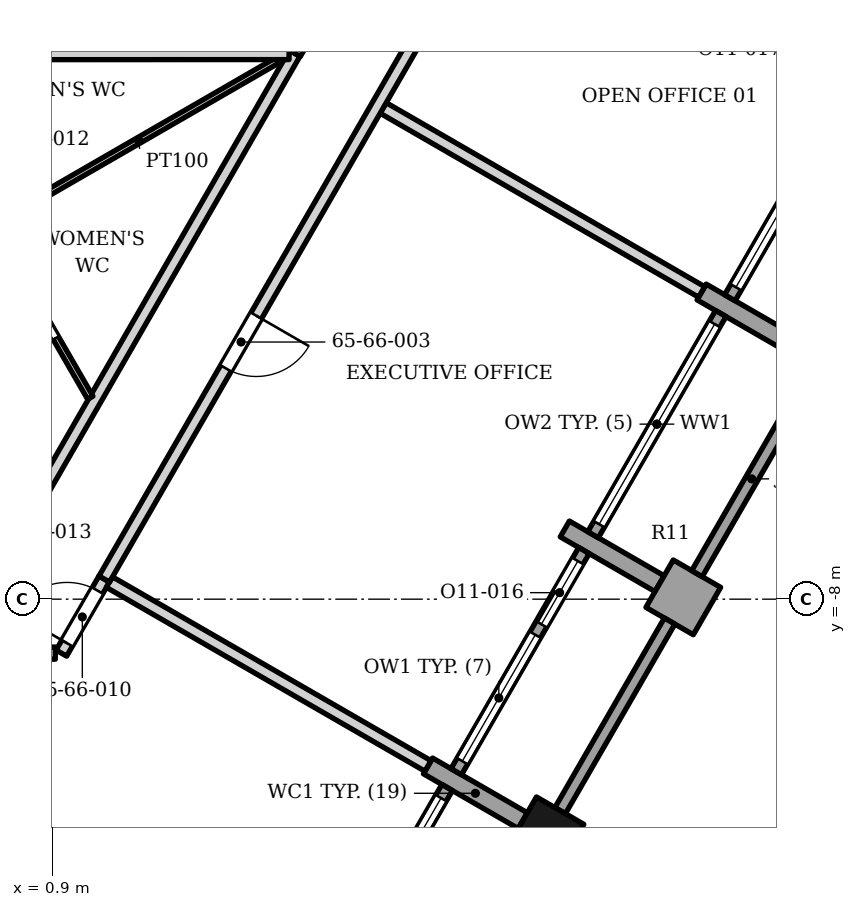
"""IFC4 building model, lengths in metres.
Left out: names, types, materials, properties, quantities, classifications, styles, units other than length and angle.
Written with IfcOpenShell. Run it as: python <this file> out.ifc"""

import sys

from ifc_helpers import new_model, si_unit, direction, frame, frame_2d, origin, origin_2d, place, context, subcontext, project, spatial, rectangle, extrude, element, fill, save


model = new_model("IFC4")
c1 = context("Model", 3, precision=1e-05, world=origin(), true_north=direction((0.0, 1.0)))
c2 = subcontext(c1, "Body", "Model", "MODEL_VIEW")
j1 = project(units=[si_unit("LENGTHUNIT", "METRE"), si_unit("PLANEANGLEUNIT", "RADIAN")], contexts=[c1])
p1 = place(None, origin())
s1 = spatial("IfcSite", under=j1, at=p1, CompositionType="ELEMENT")
p2 = place(p1, origin())
s2 = spatial("IfcBuilding", under=s1, at=p2, CompositionType="ELEMENT")
p3 = place(p2, frame((0.0, 0.0, 271.6)))
s3 = spatial("IfcBuildingStorey", under=s2, at=p3, CompositionType="ELEMENT", Elevation=271.6)
p4 = place(p3, frame((9.03, -11.867, 0.0), z_axis=(0.0, 0.0, 1.0), x_axis=(0.499999984885, 0.866025412511, 0.0)))
e1 = element("IfcColumn", 1, at=p4, inside=s3, PredefinedType="COLUMN", context=c2, shape_type="SweptSolid", body=[
    extrude(rectangle(XDim=0.9, YDim=0.9, at=origin_2d()), origin(), (0.0, 0.0, 1.0), 3.9),
])
p5 = place(p3, frame((8.64, -11.642, 0.0), z_axis=(0.0, 0.0, 1.0), x_axis=(-0.866047807691, 0.499961193289, 0.0)))
e2 = element("IfcWall", 2, at=p5, inside=s3, PredefinedType="SOLIDWALL", context=c2, shape_type="SweptSolid", body=[
    extrude(rectangle(XDim=1.8, YDim=0.3, at=frame_2d((0.9, 0.0))), origin(), (0.0, 0.0, 1.0), 3.0),
])
p6 = place(p3, frame((10.89, -7.745, 0.0), z_axis=(0.0, 0.0, 1.0), x_axis=(0.866081705922, -0.499902469156, 0.0)))
e3 = element("IfcWall", 3, at=p6, inside=s3, PredefinedType="SOLIDWALL", context=c2, shape_type="SweptSolid", body=[
    extrude(rectangle(XDim=0.9, YDim=0.9, at=frame_2d((0.45, 0.0))), origin(), (0.0, 0.0, 1.0), 3.0),
])
for number, where, z_axis, x_axis in (
    (4, (10.89, -7.745, 0.0), (0.0, 0.0, 1.0), (-0.866, 0.5, 0.0)),
    (5, (13.14, -3.848, 0.0), (0.0, 0.0, 1.0), (-0.866, 0.5, 0.0)),
):
    element("IfcWall", number, at=place(p3, frame(where, z_axis=z_axis, x_axis=x_axis)), inside=s3, PredefinedType="SOLIDWALL", context=c2, shape_type="SweptSolid", body=[
        extrude(rectangle(XDim=1.8, YDim=0.3, at=frame_2d((0.9, 0.0))), origin(), (0.0, 0.0, 1.0), 3.0),
    ])
p7 = place(p3, frame((5.296, -14.734, 0.0), z_axis=(0.0, 0.0, 1.0), x_axis=(0.49998411664, 0.866034573852, 0.0)))
e6 = element("IfcWall", 6, at=p7, inside=s3, PredefinedType="ELEMENTEDWALL", context=c2, shape_type="SweptSolid", body=[
    extrude(rectangle(XDim=4.2, YDim=0.2, at=frame_2d((2.1, 0.0))), origin(), (0.0, 0.0, 1.0), 2.95),
])
p8 = place(p7, frame((0.2, 0.0, 0.45)))
e7 = element("IfcOpeningElement", 7, at=p8, cuts=e6, PredefinedType="OPENING", context=c2, shape_type="SweptSolid", body=[
    extrude(rectangle(XDim=3.8, YDim=2.25, at=frame_2d((1.9, 1.125))), frame((0.0, 0.11, 0.0), z_axis=(0.0, -1.0, 0.0), x_axis=(1.0, 0.0, 0.0)), (0.0, 0.0, 1.0), 0.22),
])
p9 = place(p3, frame((9.255, -11.478, 0.0), z_axis=(0.0, 0.0, 1.0), x_axis=(0.500012057535, 0.866018442252, 0.0)))
e8 = element("IfcWall", 8, at=p9, inside=s3, PredefinedType="SOLIDWALL", context=c2, shape_type="SweptSolid", body=[
    extrude(rectangle(XDim=3.6, YDim=0.2, at=frame_2d((1.8, 0.0))), origin(), (0.0, 0.0, 1.0), 3.0),
])
p10 = place(p3, frame((7.546, -10.837, 0.0), z_axis=(0.0, 0.0, 1.0), x_axis=(0.49998411664, 0.866034573852, 0.0)))
e9 = element("IfcWall", 9, at=p10, inside=s3, PredefinedType="ELEMENTEDWALL", context=c2, shape_type="SweptSolid", body=[
    extrude(rectangle(XDim=4.2, YDim=0.2, at=frame_2d((2.1, 0.0))), origin(), (0.0, 0.0, 1.0), 3.0),
])
p11 = place(p10, frame((0.2, 0.0, 0.45)))
e10 = element("IfcOpeningElement", 10, at=p11, cuts=e9, PredefinedType="OPENING", context=c2, shape_type="SweptSolid", body=[
    extrude(rectangle(XDim=2.4, YDim=2.25, at=frame_2d((1.2, 1.125))), frame((0.0, 0.11, 0.0), z_axis=(0.0, -1.0, 0.0), x_axis=(1.0, 0.0, 0.0)), (0.0, 0.0, 1.0), 0.22),
])
p12 = place(p10, frame((2.8, 0.0, 0.0)))
e11 = element("IfcOpeningElement", 11, at=p12, cuts=e9, PredefinedType="OPENING", context=c2, shape_type="SweptSolid", body=[
    extrude(rectangle(XDim=1.2, YDim=2.7, at=frame_2d((0.6, 1.35))), frame((0.0, 0.11, 0.0), z_axis=(0.0, -1.0, 0.0), x_axis=(1.0, 0.0, 0.0)), (0.0, 0.0, 1.0), 0.22),
])
p13 = place(p3, frame((11.505, -7.58, 0.0), z_axis=(0.0, 0.0, 1.0), x_axis=(0.500012057535, 0.866018442252, 0.0)))
e12 = element("IfcWall", 12, at=p13, inside=s3, PredefinedType="SOLIDWALL", context=c2, shape_type="SweptSolid", body=[
    extrude(rectangle(XDim=3.6, YDim=0.2, at=frame_2d((1.8, 0.0))), origin(), (0.0, 0.0, 1.0), 3.0),
])
p14 = place(p3, frame((9.796, -6.94, 0.0), z_axis=(0.0, 0.0, 1.0), x_axis=(0.499958946799, 0.866049104564, 0.0)))
e13 = element("IfcWall", 13, at=p14, inside=s3, PredefinedType="ELEMENTEDWALL", context=c2, shape_type="SweptSolid", body=[
    extrude(rectangle(XDim=4.2, YDim=0.2, at=frame_2d((2.1, 0.0))), origin(), (0.0, 0.0, 1.0), 3.0),
])
p15 = place(p14, frame((0.2, 0.0, 0.45)))
e14 = element("IfcOpeningElement", 14, at=p15, cuts=e13, PredefinedType="OPENING", context=c2, shape_type="SweptSolid", body=[
    extrude(rectangle(XDim=3.8, YDim=2.25, at=frame_2d((1.9, 1.125))), frame((0.0, 0.11, 0.0), z_axis=(0.0, -1.0, 0.0), x_axis=(1.0, 0.0, 0.0)), (0.0, 0.0, 1.0), 0.22),
])
p16 = place(p3, frame((12.046, -3.043, 0.0), z_axis=(0.0, 0.0, 1.0), x_axis=(0.49998411664, 0.866034573852, 0.0)))
e15 = element("IfcWall", 15, at=p16, inside=s3, PredefinedType="ELEMENTEDWALL", context=c2, shape_type="SweptSolid", body=[
    extrude(rectangle(XDim=4.2, YDim=0.2, at=frame_2d((2.1, 0.0))), origin(), (0.0, 0.0, 1.0), 3.0),
])
p17 = place(p16, frame((0.2, 0.0, 0.45)))
e16 = element("IfcOpeningElement", 16, at=p17, cuts=e15, PredefinedType="OPENING", context=c2, shape_type="SweptSolid", body=[
    extrude(rectangle(XDim=2.4, YDim=2.25, at=frame_2d((1.2, 1.125))), frame((0.0, 0.11, 0.0), z_axis=(0.0, -1.0, 0.0), x_axis=(1.0, 0.0, 0.0)), (0.0, 0.0, 1.0), 0.22),
])
p18 = place(p16, frame((2.8, 0.0, 0.0)))
e17 = element("IfcOpeningElement", 17, at=p18, cuts=e15, PredefinedType="OPENING", context=c2, shape_type="SweptSolid", body=[
    extrude(rectangle(XDim=1.2, YDim=2.7, at=frame_2d((0.6, 1.35))), frame((0.0, 0.11, 0.0), z_axis=(0.0, -1.0, 0.0), x_axis=(1.0, 0.0, 0.0)), (0.0, 0.0, 1.0), 0.22),
])
p19 = place(p3, frame((0.0, -8.889, 0.0), z_axis=(0.0, 0.0, 1.0), x_axis=(0.999998814747, 0.001539644057, 0.0)))
e18 = element("IfcWall", 18, at=p19, inside=s3, PredefinedType="PARTITIONING", context=c2, shape_type="SweptSolid", body=[
    extrude(rectangle(XDim=0.951, YDim=0.2, at=frame_2d((0.476, 0.0))), origin(), (0.0, 0.0, 1.0), 3.73),
])
p20 = place(p3, frame((1.052, -8.887, 0.0), z_axis=(0.0, 0.0, 1.0), x_axis=(0.500967914192, 0.865465856606, 0.0)))
e19 = element("IfcWall", 19, at=p20, inside=s3, PredefinedType="PARTITIONING", context=c2, shape_type="SweptSolid", body=[
    extrude(rectangle(XDim=1.408, YDim=0.2, at=frame_2d((0.704, 0.0))), origin(), (0.0, 0.0, 1.0), 3.73),
])
p21 = place(p20, frame((0.188, 0.0, 0.0)))
e20 = element("IfcOpeningElement", 20, at=p21, cuts=e19, PredefinedType="OPENING", context=c2, shape_type="SweptSolid", body=[
    extrude(rectangle(XDim=1.0, YDim=2.1, at=frame_2d((0.5, 1.05))), frame((0.0, 0.11, 0.0), z_axis=(0.0, -1.0, 0.0), x_axis=(1.0, 0.0, 0.0)), (0.0, 0.0, 1.0), 0.22),
])
p22 = place(p3, frame((1.841, -7.719, 0.0), z_axis=(0.0, 0.0, 1.0), x_axis=(0.866131832054, -0.499815615506, 0.0)))
e21 = element("IfcWall", 21, at=p22, inside=s3, PredefinedType="PARTITIONING", context=c2, shape_type="SweptSolid", body=[
    extrude(rectangle(XDim=6.05, YDim=0.2, at=frame_2d((3.025, 0.0))), origin(), (0.0, 0.0, 1.0), 2.884),
])
p23 = place(p3, frame((0.67, -6.346, 0.0), z_axis=(0.0, 0.0, 1.0), x_axis=(0.499143893265, 0.866519113359, 0.0)))
e22 = element("IfcWall", 22, at=p23, inside=s3, PredefinedType="PARTITIONING", context=c2, shape_type="SweptSolid", body=[
    extrude(rectangle(XDim=8.452, YDim=0.2, at=frame_2d((4.226, 0.0))), origin(), (0.0, 0.0, 1.0), 2.884),
])
p24 = place(p3, frame((6.344, 0.079, 0.0), z_axis=(0.0, 0.0, 1.0), x_axis=(0.865886439471, -0.500240616045, 0.0)))
e23 = element("IfcWall", 23, at=p24, inside=s3, PredefinedType="PARTITIONING", context=c2, shape_type="SweptSolid", body=[
    extrude(rectangle(XDim=6.049, YDim=0.2, at=frame_2d((3.025, 0.0))), origin(), (0.0, 0.0, 1.0), 3.052),
])
p25 = place(p3, frame((-0.062, -1.834, 0.0), z_axis=(0.0, 0.0, 1.0), x_axis=(0.865950314505, 0.5001300359, 0.0)))
e24 = element("IfcWall", 24, at=p25, inside=s3, PredefinedType="PARTITIONING", context=c2, shape_type="SweptSolid", body=[
    extrude(rectangle(XDim=5.513, YDim=0.1, at=frame_2d((2.757, 0.0))), origin(), (0.0, 0.0, 1.0), 2.884),
])
p26 = place(p3, frame((-1.741, 0.974, 0.0), z_axis=(0.0, 0.0, 1.0), x_axis=(0.499978916304, -0.86603757612, 0.0)))
e25 = element("IfcWall", 25, at=p26, inside=s3, PredefinedType="PARTITIONING", context=c2, shape_type="SweptSolid", body=[
    extrude(rectangle(XDim=6.537, YDim=0.1, at=frame_2d((3.269, 0.0))), origin(), (0.0, 0.0, 1.0), 2.884),
])
p27 = place(p26, frame((1.184, 0.0, 0.0)))
e26 = element("IfcOpeningElement", 26, at=p27, cuts=e25, PredefinedType="OPENING", context=c2, shape_type="SweptSolid", body=[
    extrude(rectangle(XDim=0.9, YDim=2.1, at=frame_2d((0.45, 1.05))), frame((0.0, 0.06, 0.0), z_axis=(0.0, -1.0, 0.0), x_axis=(1.0, 0.0, 0.0)), (0.0, 0.0, 1.0), 0.12),
])
p28 = place(p26, frame((4.504, 0.0, 0.0)))
e27 = element("IfcOpeningElement", 27, at=p28, cuts=e25, PredefinedType="OPENING", context=c2, shape_type="SweptSolid", body=[
    extrude(rectangle(XDim=0.9, YDim=2.1, at=frame_2d((0.45, 1.05))), frame((0.0, 0.06, 0.0), z_axis=(0.0, -1.0, 0.0), x_axis=(1.0, 0.0, 0.0)), (0.0, 0.0, 1.0), 0.12),
])
p29 = place(p3, frame((-1.692, 0.972, 0.0), z_axis=(0.0, 0.0, 1.0), x_axis=(0.999999954692, 0.000301023466, 0.0)))
e28 = element("IfcWall", 28, at=p29, inside=s3, PredefinedType="PARTITIONING", context=c2, shape_type="SweptSolid", body=[
    extrude(rectangle(XDim=6.488, YDim=0.2, at=frame_2d((3.244, 0.0))), origin(), (0.0, 0.0, 1.0), 3.73),
])
p30 = place(p3, frame((4.894, 0.974, 0.0), z_axis=(0.0, 0.0, 1.0), x_axis=(0.500549430369, 0.865707957545, 0.0)))
e29 = element("IfcWall", 29, at=p30, inside=s3, PredefinedType="PARTITIONING", context=c2, shape_type="SweptSolid", body=[
    extrude(rectangle(XDim=2.768, YDim=0.2, at=frame_2d((1.384, 0.0))), origin(), (0.0, 0.0, 1.0), 3.73),
])
p31 = place(p3, frame((1.757, -7.668, 0.0), z_axis=(0.0, 0.0, 1.0), x_axis=(0.500002084865, 0.866024200084, 0.0)))
e30 = element("IfcWall", 30, at=p31, inside=s3, PredefinedType="PARTITIONING", context=c2, shape_type="SweptSolid", body=[
    extrude(rectangle(XDim=12.949, YDim=0.2, at=frame_2d((6.474, 0.0))), origin(), (0.0, 0.0, 1.0), 2.884),
])
p32 = place(p31, frame((4.0, 0.0, 0.0)))
e31 = element("IfcOpeningElement", 31, at=p32, cuts=e30, PredefinedType="OPENING", context=c2, shape_type="SweptSolid", body=[
    extrude(rectangle(XDim=1.0, YDim=2.4, at=frame_2d((0.5, 1.2))), frame((0.0, 0.11, 0.0), z_axis=(0.0, -1.0, 0.0), x_axis=(1.0, 0.0, 0.0)), (0.0, 0.0, 1.0), 0.22),
])
p33 = place(p8, origin())
e32 = element("IfcWindow", 32, at=p33, inside=s3, PartitioningType="SINGLE_PANEL", PredefinedType="WINDOW", context=c2, shape_type="SweptSolid", body=[
    extrude(rectangle(XDim=3.8, YDim=2.25, at=frame_2d((1.9, 1.125))), frame((0.0, 0.03, 0.0), z_axis=(0.0, -1.0, 0.0), x_axis=(1.0, 0.0, 0.0)), (0.0, 0.0, 1.0), 0.06),
])
fill(e7, e32)
p34 = place(p11, origin())
e33 = element("IfcWindow", 33, at=p34, inside=s3, PartitioningType="SINGLE_PANEL", PredefinedType="WINDOW", context=c2, shape_type="SweptSolid", body=[
    extrude(rectangle(XDim=2.4, YDim=2.25, at=frame_2d((1.2, 1.125))), frame((0.0, 0.03, 0.0), z_axis=(0.0, -1.0, 0.0), x_axis=(1.0, 0.0, 0.0)), (0.0, 0.0, 1.0), 0.06),
])
fill(e10, e33)
p35 = place(p12, origin())
e34 = element("IfcDoor", 34, at=p35, inside=s3, OperationType="SINGLE_SWING_LEFT", PredefinedType="DOOR", context=c2, shape_type="SweptSolid", body=[
    extrude(rectangle(XDim=1.2, YDim=2.7, at=frame_2d((0.6, 1.35))), frame((0.0, 0.025, 0.0), z_axis=(0.0, -1.0, 0.0), x_axis=(1.0, 0.0, 0.0)), (0.0, 0.0, 1.0), 0.05),
])
fill(e11, e34)
p36 = place(p15, origin())
e35 = element("IfcWindow", 35, at=p36, inside=s3, PartitioningType="SINGLE_PANEL", PredefinedType="WINDOW", context=c2, shape_type="SweptSolid", body=[
    extrude(rectangle(XDim=3.8, YDim=2.25, at=frame_2d((1.9, 1.125))), frame((0.0, 0.03, 0.0), z_axis=(0.0, -1.0, 0.0), x_axis=(1.0, 0.0, 0.0)), (0.0, 0.0, 1.0), 0.06),
])
fill(e14, e35)
p37 = place(p17, origin())
e36 = element("IfcWindow", 36, at=p37, inside=s3, PartitioningType="SINGLE_PANEL", PredefinedType="WINDOW", context=c2, shape_type="SweptSolid", body=[
    extrude(rectangle(XDim=2.4, YDim=2.25, at=frame_2d((1.2, 1.125))), frame((0.0, 0.03, 0.0), z_axis=(0.0, -1.0, 0.0), x_axis=(1.0, 0.0, 0.0)), (0.0, 0.0, 1.0), 0.06),
])
fill(e16, e36)
p38 = place(p32, origin())
e37 = element("IfcDoor", 37, at=p38, inside=s3, OperationType="SINGLE_SWING_RIGHT", PredefinedType="DOOR", context=c2, shape_type="SweptSolid", body=[
    extrude(rectangle(XDim=1.0, YDim=2.4, at=frame_2d((0.5, 1.2))), frame((0.0, 0.025, 0.0), z_axis=(0.0, -1.0, 0.0), x_axis=(1.0, 0.0, 0.0)), (0.0, 0.0, 1.0), 0.05),
])
fill(e31, e37)
p39 = place(p21, origin())
e38 = element("IfcDoor", 38, at=p39, inside=s3, OperationType="SINGLE_SWING_LEFT", PredefinedType="DOOR", context=c2, shape_type="SweptSolid", body=[
    extrude(rectangle(XDim=1.0, YDim=2.1, at=frame_2d((0.5, 1.05))), frame((0.0, 0.025, 0.0), z_axis=(0.0, -1.0, 0.0), x_axis=(1.0, 0.0, 0.0)), (0.0, 0.0, 1.0), 0.05),
])
fill(e20, e38)
p40 = place(p28, origin())
e39 = element("IfcDoor", 39, at=p40, inside=s3, OperationType="SINGLE_SWING_RIGHT", PredefinedType="DOOR", context=c2, shape_type="SweptSolid", body=[
    extrude(rectangle(XDim=0.9, YDim=2.1, at=frame_2d((0.45, 1.05))), frame((0.0, 0.025, 0.0), z_axis=(0.0, -1.0, 0.0), x_axis=(1.0, 0.0, 0.0)), (0.0, 0.0, 1.0), 0.05),
])
fill(e27, e39)
save(model, sys.argv[1])
